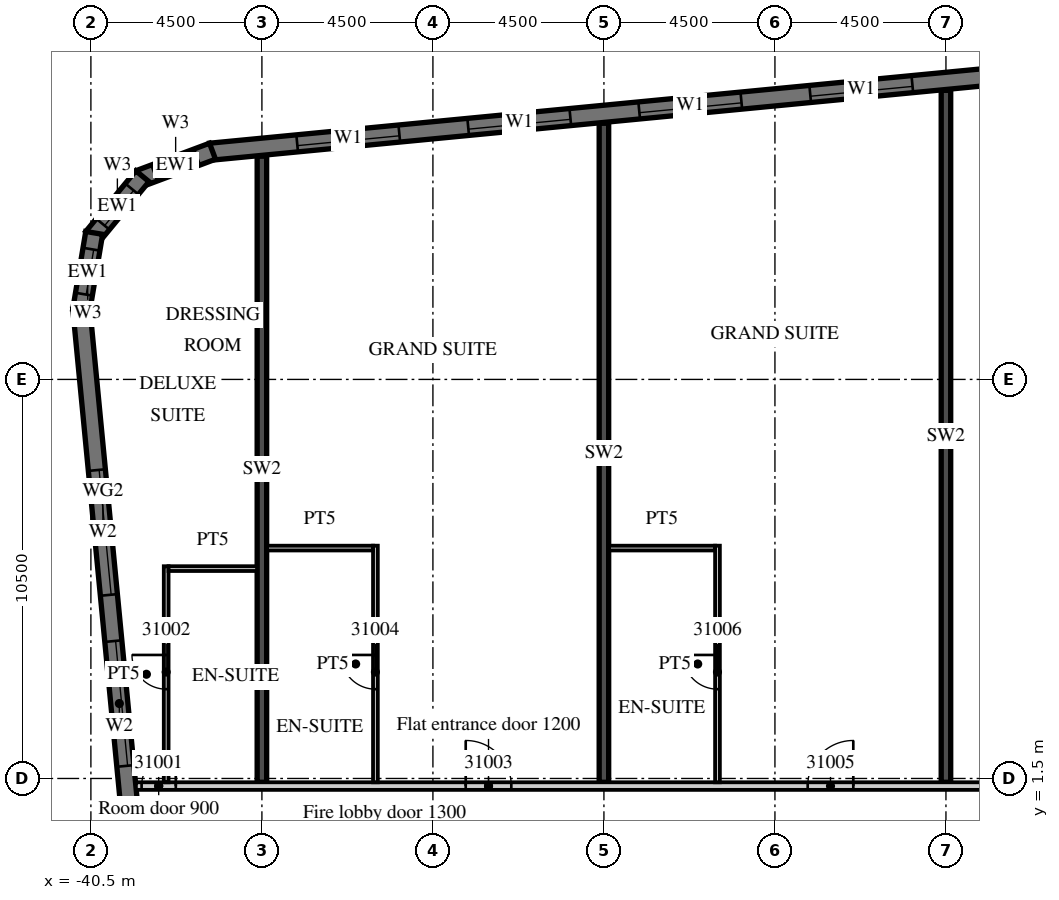
"""IFC4 building model, lengths in metres.
Left out: names, types, materials, properties, quantities, classifications, styles, units other than length and angle.
Written with IfcOpenShell. Run it as: python <this file> out.ifc"""

import sys

from ifc_helpers import new_model, si_unit, direction, frame, frame_2d, origin, place, context, subcontext, project, spatial, polyline, rectangle, outline, extrude, element, fill, save


model = new_model("IFC4")
c1 = context("Model", 3, precision=1e-05, world=origin(), true_north=direction((0.0, 1.0)))
c2 = subcontext(c1, "Body", "Model", "MODEL_VIEW")
j1 = project(units=[si_unit("LENGTHUNIT", "METRE"), si_unit("PLANEANGLEUNIT", "RADIAN")], contexts=[c1])
p1 = place(None, origin())
s1 = spatial("IfcSite", under=j1, at=p1, CompositionType="ELEMENT")
p2 = place(p1, origin())
s2 = spatial("IfcBuilding", under=s1, at=p2, CompositionType="ELEMENT")
p3 = place(p2, frame((0.0, 0.0, 137.2)))
s3 = spatial("IfcBuildingStorey", under=s2, at=p3, CompositionType="ELEMENT", Elevation=137.2)
p4 = place(p3, frame((-36.0, 1.4, 0.0), z_axis=(0.0, 0.0, 1.0), x_axis=(0.0, 1.0, 0.0)))
e1 = element("IfcWall", 1, at=p4, inside=s3, PredefinedType="SHEAR", context=c2, shape_type="SweptSolid", body=[
    extrude(rectangle(XDim=16.474, YDim=0.25, at=frame_2d((8.237, 0.0))), origin(), (0.0, 0.0, 1.0), 3.3),
])
p5 = place(p3, frame((-27.0, 1.4, 0.0), z_axis=(0.0, 0.0, 1.0), x_axis=(0.0, 1.0, 0.0)))
e2 = element("IfcWall", 2, at=p5, inside=s3, PredefinedType="SHEAR", context=c2, shape_type="SweptSolid", body=[
    extrude(rectangle(XDim=17.34, YDim=0.25, at=frame_2d((8.67, 0.0))), origin(), (0.0, 0.0, 1.0), 3.3),
])
p6 = place(p3, frame((-18.0, 1.4, 0.0), z_axis=(0.0, 0.0, 1.0), x_axis=(0.0, 1.0, 0.0)))
e3 = element("IfcWall", 3, at=p6, inside=s3, PredefinedType="SHEAR", context=c2, shape_type="SweptSolid", body=[
    extrude(rectangle(XDim=18.207, YDim=0.25, at=frame_2d((9.104, 0.0))), origin(), (0.0, 0.0, 1.0), 3.3),
])
p7 = place(p3, frame((-40.753, 13.872, 0.0), z_axis=(0.0, 0.0, 1.0), x_axis=(0.095843327381, -0.995396431878, 0.0)))
e4 = element("IfcWall", 4, at=p7, inside=s3, PredefinedType="SOLIDWALL", context=c2, shape_type="SweptSolid", body=[
    extrude(rectangle(XDim=35.0, YDim=0.45, at=frame_2d((17.5, 0.0))), origin(), (0.0, 0.0, 1.0), 3.02),
])
p8 = place(p7, frame((4.277, 0.0, 0.45)))
e5 = element("IfcOpeningElement", 5, at=p8, cuts=e4, PredefinedType="OPENING", context=c2, shape_type="SweptSolid", body=[
    extrude(rectangle(XDim=3.3, YDim=2.25, at=frame_2d((1.65, 1.125))), frame((0.0, 0.235, 0.0), z_axis=(0.0, -1.0, 0.0), x_axis=(1.0, 0.0, 0.0)), (0.0, 0.0, 1.0), 0.47),
])
p9 = place(p7, frame((8.798, 0.0, 0.45)))
e6 = element("IfcOpeningElement", 6, at=p9, cuts=e4, PredefinedType="OPENING", context=c2, shape_type="SweptSolid", body=[
    extrude(rectangle(XDim=3.3, YDim=2.25, at=frame_2d((1.65, 1.125))), frame((0.0, 0.235, 0.0), z_axis=(0.0, -1.0, 0.0), x_axis=(1.0, 0.0, 0.0)), (0.0, 0.0, 1.0), 0.47),
])
p10 = place(p3, frame((13.521, 22.89, 0.0), z_axis=(0.0, 0.0, 1.0), x_axis=(-0.995396445054, -0.095843190545, 0.0)))
e7 = element("IfcWall", 7, at=p10, inside=s3, PredefinedType="SOLIDWALL", context=c2, shape_type="SweptSolid", body=[
    extrude(rectangle(XDim=51.114, YDim=0.45, at=frame_2d((25.557, 0.0))), origin(), (0.0, 0.0, 1.0), 3.02),
])
p11 = place(p10, frame((0.91, 0.0, 0.45)))
e8 = element("IfcOpeningElement", 8, at=p11, cuts=e7, PredefinedType="OPENING", context=c2, shape_type="SweptSolid", body=[
    extrude(rectangle(XDim=2.7, YDim=2.25, at=frame_2d((1.35, 1.125))), frame((0.0, 0.235, 0.0), z_axis=(0.0, -1.0, 0.0), x_axis=(1.0, 0.0, 0.0)), (0.0, 0.0, 1.0), 0.47),
])
p12 = place(p10, frame((5.431, 0.0, 0.45)))
e9 = element("IfcOpeningElement", 9, at=p12, cuts=e7, PredefinedType="OPENING", context=c2, shape_type="SweptSolid", body=[
    extrude(rectangle(XDim=2.7, YDim=2.25, at=frame_2d((1.35, 1.125))), frame((0.0, 0.235, 0.0), z_axis=(0.0, -1.0, 0.0), x_axis=(1.0, 0.0, 0.0)), (0.0, 0.0, 1.0), 0.47),
])
p13 = place(p10, frame((9.952, 0.0, 0.45)))
e10 = element("IfcOpeningElement", 10, at=p13, cuts=e7, PredefinedType="OPENING", context=c2, shape_type="SweptSolid", body=[
    extrude(rectangle(XDim=2.7, YDim=2.25, at=frame_2d((1.35, 1.125))), frame((0.0, 0.235, 0.0), z_axis=(0.0, -1.0, 0.0), x_axis=(1.0, 0.0, 0.0)), (0.0, 0.0, 1.0), 0.47),
])
p14 = place(p10, frame((14.473, 0.0, 0.45)))
e11 = element("IfcOpeningElement", 11, at=p14, cuts=e7, PredefinedType="OPENING", context=c2, shape_type="SweptSolid", body=[
    extrude(rectangle(XDim=2.7, YDim=2.25, at=frame_2d((1.35, 1.125))), frame((0.0, 0.235, 0.0), z_axis=(0.0, -1.0, 0.0), x_axis=(1.0, 0.0, 0.0)), (0.0, 0.0, 1.0), 0.47),
])
p15 = place(p10, frame((18.994, 0.0, 0.45)))
e12 = element("IfcOpeningElement", 12, at=p15, cuts=e7, PredefinedType="OPENING", context=c2, shape_type="SweptSolid", body=[
    extrude(rectangle(XDim=2.7, YDim=2.25, at=frame_2d((1.35, 1.125))), frame((0.0, 0.235, 0.0), z_axis=(0.0, -1.0, 0.0), x_axis=(1.0, 0.0, 0.0)), (0.0, 0.0, 1.0), 0.47),
])
p16 = place(p10, frame((23.514, 0.0, 0.45)))
e13 = element("IfcOpeningElement", 13, at=p16, cuts=e7, PredefinedType="OPENING", context=c2, shape_type="SweptSolid", body=[
    extrude(rectangle(XDim=2.7, YDim=2.25, at=frame_2d((1.35, 1.125))), frame((0.0, 0.235, 0.0), z_axis=(0.0, -1.0, 0.0), x_axis=(1.0, 0.0, 0.0)), (0.0, 0.0, 1.0), 0.47),
])
p17 = place(p10, frame((28.035, 0.0, 0.45)))
e14 = element("IfcOpeningElement", 14, at=p17, cuts=e7, PredefinedType="OPENING", context=c2, shape_type="SweptSolid", body=[
    extrude(rectangle(XDim=2.7, YDim=2.25, at=frame_2d((1.35, 1.125))), frame((0.0, 0.235, 0.0), z_axis=(0.0, -1.0, 0.0), x_axis=(1.0, 0.0, 0.0)), (0.0, 0.0, 1.0), 0.47),
])
p18 = place(p10, frame((32.556, 0.0, 0.45)))
e15 = element("IfcOpeningElement", 15, at=p18, cuts=e7, PredefinedType="OPENING", context=c2, shape_type="SweptSolid", body=[
    extrude(rectangle(XDim=2.7, YDim=2.25, at=frame_2d((1.35, 1.125))), frame((0.0, 0.235, 0.0), z_axis=(0.0, -1.0, 0.0), x_axis=(1.0, 0.0, 0.0)), (0.0, 0.0, 1.0), 0.47),
])
p19 = place(p10, frame((37.077, 0.0, 0.45)))
e16 = element("IfcOpeningElement", 16, at=p19, cuts=e7, PredefinedType="OPENING", context=c2, shape_type="SweptSolid", body=[
    extrude(rectangle(XDim=2.7, YDim=2.25, at=frame_2d((1.35, 1.125))), frame((0.0, 0.235, 0.0), z_axis=(0.0, -1.0, 0.0), x_axis=(1.0, 0.0, 0.0)), (0.0, 0.0, 1.0), 0.47),
])
p20 = place(p10, frame((41.598, 0.0, 0.45)))
e17 = element("IfcOpeningElement", 17, at=p20, cuts=e7, PredefinedType="OPENING", context=c2, shape_type="SweptSolid", body=[
    extrude(rectangle(XDim=2.7, YDim=2.25, at=frame_2d((1.35, 1.125))), frame((0.0, 0.235, 0.0), z_axis=(0.0, -1.0, 0.0), x_axis=(1.0, 0.0, 0.0)), (0.0, 0.0, 1.0), 0.47),
])
p21 = place(p10, frame((46.118, 0.0, 0.45)))
e18 = element("IfcOpeningElement", 18, at=p21, cuts=e7, PredefinedType="OPENING", context=c2, shape_type="SweptSolid", body=[
    extrude(rectangle(XDim=2.7, YDim=2.25, at=frame_2d((1.35, 1.125))), frame((0.0, 0.235, 0.0), z_axis=(0.0, -1.0, 0.0), x_axis=(1.0, 0.0, 0.0)), (0.0, 0.0, 1.0), 0.47),
])
p22 = place(p3, frame((-37.3, 18.004, 0.0), z_axis=(0.0, 0.0, 1.0), x_axis=(-0.936677599948, -0.350192909346, 0.0)))
e19 = element("IfcWall", 19, at=p22, inside=s3, PredefinedType="SOLIDWALL", context=c2, shape_type="SweptSolid", body=[
    extrude(outline(polyline([(0.0, -0.225), (2.071, -0.225), (1.95, 0.225), (0.121, 0.225), (0.0, -0.225)])), origin(), (0.0, 0.0, 1.0), 3.02),
])
p23 = place(p22, frame((0.435, 0.0, 0.45)))
e20 = element("IfcOpeningElement", 20, at=p23, cuts=e19, PredefinedType="OPENING", context=c2, shape_type="SweptSolid", body=[
    extrude(rectangle(XDim=1.2, YDim=2.25, at=frame_2d((0.6, 1.125))), frame((0.0, 0.235, 0.0), z_axis=(0.0, -1.0, 0.0), x_axis=(1.0, 0.0, 0.0)), (0.0, 0.0, 1.0), 0.47),
])
p24 = place(p3, frame((-39.145, 17.347, 0.0), z_axis=(0.0, 0.0, 1.0), x_axis=(-0.636046112757, -0.771651049663, 0.0)))
e21 = element("IfcWall", 21, at=p24, inside=s3, PredefinedType="SOLIDWALL", context=c2, shape_type="SweptSolid", body=[
    extrude(outline(polyline([(0.0, -0.225), (2.071, -0.225), (1.95, 0.225), (0.121, 0.225), (0.0, -0.225)])), origin(), (0.0, 0.0, 1.0), 3.02),
])
p25 = place(p24, frame((0.435, 0.0, 0.45)))
e22 = element("IfcOpeningElement", 22, at=p25, cuts=e21, PredefinedType="OPENING", context=c2, shape_type="SweptSolid", body=[
    extrude(rectangle(XDim=1.2, YDim=2.25, at=frame_2d((0.6, 1.125))), frame((0.0, 0.235, 0.0), z_axis=(0.0, -1.0, 0.0), x_axis=(1.0, 0.0, 0.0)), (0.0, 0.0, 1.0), 0.47),
])
p26 = place(p3, frame((-40.413, 15.855, 0.0), z_axis=(0.0, 0.0, 1.0), x_axis=(-0.165068144653, -0.986282164302, 0.0)))
e23 = element("IfcWall", 23, at=p26, inside=s3, PredefinedType="SOLIDWALL", context=c2, shape_type="SweptSolid", body=[
    extrude(outline(polyline([(0.0, -0.225), (2.071, -0.225), (1.95, 0.225), (0.121, 0.225), (0.0, -0.225)])), origin(), (0.0, 0.0, 1.0), 3.02),
])
p27 = place(p26, frame((0.435, 0.0, 0.45)))
e24 = element("IfcOpeningElement", 24, at=p27, cuts=e23, PredefinedType="OPENING", context=c2, shape_type="SweptSolid", body=[
    extrude(rectangle(XDim=1.2, YDim=2.25, at=frame_2d((0.6, 1.125))), frame((0.0, 0.235, 0.0), z_axis=(0.0, -1.0, 0.0), x_axis=(1.0, 0.0, 0.0)), (0.0, 0.0, 1.0), 0.47),
])
p28 = place(p3, frame((-39.316, 1.3, 0.0), z_axis=(0.0, 0.0, 1.0), x_axis=(1.0, 0.0, 0.0)))
e25 = element("IfcWall", 25, at=p28, inside=s3, PredefinedType="PARTITIONING", context=c2, shape_type="SweptSolid", body=[
    extrude(rectangle(XDim=52.816, YDim=0.2, at=frame_2d((26.408, 0.0))), origin(), (0.0, 0.0, 1.0), 3.02),
])
p29 = place(p28, frame((0.15, 0.0, 0.0)))
e26 = element("IfcOpeningElement", 26, at=p29, cuts=e25, PredefinedType="OPENING", context=c2, shape_type="SweptSolid", body=[
    extrude(rectangle(XDim=0.9, YDim=2.1, at=frame_2d((0.45, 1.05))), frame((0.0, 0.11, 0.0), z_axis=(0.0, -1.0, 0.0), x_axis=(1.0, 0.0, 0.0)), (0.0, 0.0, 1.0), 0.22),
])
p30 = place(p28, frame((8.679, 0.0, 0.0)))
e27 = element("IfcOpeningElement", 27, at=p30, cuts=e25, PredefinedType="OPENING", context=c2, shape_type="SweptSolid", body=[
    extrude(rectangle(XDim=1.2, YDim=2.1, at=frame_2d((0.6, 1.05))), frame((0.0, 0.11, 0.0), z_axis=(0.0, -1.0, 0.0), x_axis=(1.0, 0.0, 0.0)), (0.0, 0.0, 1.0), 0.22),
])
p31 = place(p28, frame((17.678, 0.0, 0.0)))
e28 = element("IfcOpeningElement", 28, at=p31, cuts=e25, PredefinedType="OPENING", context=c2, shape_type="SweptSolid", body=[
    extrude(rectangle(XDim=1.2, YDim=2.1, at=frame_2d((0.6, 1.05))), frame((0.0, 0.11, 0.0), z_axis=(0.0, -1.0, 0.0), x_axis=(1.0, 0.0, 0.0)), (0.0, 0.0, 1.0), 0.22),
])
p32 = place(p28, frame((23.754, 0.0, 0.0)))
e29 = element("IfcOpeningElement", 29, at=p32, cuts=e25, PredefinedType="OPENING", context=c2, shape_type="SweptSolid", body=[
    extrude(rectangle(XDim=1.2, YDim=2.1, at=frame_2d((0.6, 1.05))), frame((0.0, 0.11, 0.0), z_axis=(0.0, -1.0, 0.0), x_axis=(1.0, 0.0, 0.0)), (0.0, 0.0, 1.0), 0.22),
])
p33 = place(p28, frame((30.891, 0.0, 0.0)))
e30 = element("IfcOpeningElement", 30, at=p33, cuts=e25, PredefinedType="OPENING", context=c2, shape_type="SweptSolid", body=[
    extrude(rectangle(XDim=1.0, YDim=2.1, at=frame_2d((0.5, 1.05))), frame((0.0, 0.11, 0.0), z_axis=(0.0, -1.0, 0.0), x_axis=(1.0, 0.0, 0.0)), (0.0, 0.0, 1.0), 0.22),
])
p34 = place(p28, frame((37.741, 0.0, 0.0)))
e31 = element("IfcOpeningElement", 31, at=p34, cuts=e25, PredefinedType="OPENING", context=c2, shape_type="SweptSolid", body=[
    extrude(rectangle(XDim=1.0, YDim=2.1, at=frame_2d((0.5, 1.05))), frame((0.0, 0.11, 0.0), z_axis=(0.0, -1.0, 0.0), x_axis=(1.0, 0.0, 0.0)), (0.0, 0.0, 1.0), 0.22),
])
p35 = place(p28, frame((41.754, 0.0, 0.0)))
e32 = element("IfcOpeningElement", 32, at=p35, cuts=e25, PredefinedType="OPENING", context=c2, shape_type="SweptSolid", body=[
    extrude(rectangle(XDim=1.2, YDim=2.1, at=frame_2d((0.6, 1.05))), frame((0.0, 0.11, 0.0), z_axis=(0.0, -1.0, 0.0), x_axis=(1.0, 0.0, 0.0)), (0.0, 0.0, 1.0), 0.22),
])
p36 = place(p28, frame((48.891, 0.0, 0.0)))
e33 = element("IfcOpeningElement", 33, at=p36, cuts=e25, PredefinedType="OPENING", context=c2, shape_type="SweptSolid", body=[
    extrude(rectangle(XDim=1.0, YDim=2.1, at=frame_2d((0.5, 1.05))), frame((0.0, 0.11, 0.0), z_axis=(0.0, -1.0, 0.0), x_axis=(1.0, 0.0, 0.0)), (0.0, 0.0, 1.0), 0.22),
])
p37 = place(p3, frame((-38.519, 1.4, 0.0), z_axis=(0.0, 0.0, 1.0), x_axis=(0.0, 1.0, 0.0)))
e34 = element("IfcWall", 34, at=p37, inside=s3, PredefinedType="PARTITIONING", context=c2, shape_type="SweptSolid", body=[
    extrude(rectangle(XDim=5.684, YDim=0.125, at=frame_2d((2.842, 0.0))), origin(), (0.0, 0.0, 1.0), 3.02),
])
p38 = place(p37, frame((2.45, 0.0, 0.0)))
e35 = element("IfcOpeningElement", 35, at=p38, cuts=e34, PredefinedType="OPENING", context=c2, shape_type="SweptSolid", body=[
    extrude(rectangle(XDim=0.9, YDim=2.1, at=frame_2d((0.45, 1.05))), frame((0.0, 0.073, 0.0), z_axis=(0.0, -1.0, 0.0), x_axis=(1.0, 0.0, 0.0)), (0.0, 0.0, 1.0), 0.145),
])
p39 = place(p3, frame((-38.457, 7.022, 0.0), z_axis=(0.0, 0.0, 1.0), x_axis=(1.0, 0.0, 0.0)))
e36 = element("IfcWall", 36, at=p39, inside=s3, PredefinedType="PARTITIONING", context=c2, shape_type="SweptSolid", body=[
    extrude(rectangle(XDim=2.332, YDim=0.125, at=frame_2d((1.166, 0.0))), origin(), (0.0, 0.0, 1.0), 3.02),
])
p40 = place(p3, frame((-33.013, 1.4, 0.0), z_axis=(0.0, 0.0, 1.0), x_axis=(0.0, 1.0, 0.0)))
e37 = element("IfcWall", 37, at=p40, inside=s3, PredefinedType="PARTITIONING", context=c2, shape_type="SweptSolid", body=[
    extrude(rectangle(XDim=6.225, YDim=0.125, at=frame_2d((3.113, 0.0))), origin(), (0.0, 0.0, 1.0), 3.02),
])
p41 = place(p40, frame((2.45, 0.0, 0.0)))
e38 = element("IfcOpeningElement", 38, at=p41, cuts=e37, PredefinedType="OPENING", context=c2, shape_type="SweptSolid", body=[
    extrude(rectangle(XDim=0.9, YDim=2.1, at=frame_2d((0.45, 1.05))), frame((0.0, 0.073, 0.0), z_axis=(0.0, -1.0, 0.0), x_axis=(1.0, 0.0, 0.0)), (0.0, 0.0, 1.0), 0.145),
])
p42 = place(p3, frame((-35.875, 7.562, 0.0), z_axis=(0.0, 0.0, 1.0), x_axis=(1.0, 0.0, 0.0)))
e39 = element("IfcWall", 39, at=p42, inside=s3, PredefinedType="PARTITIONING", context=c2, shape_type="SweptSolid", body=[
    extrude(rectangle(XDim=2.8, YDim=0.125, at=frame_2d((1.4, 0.0))), origin(), (0.0, 0.0, 1.0), 3.02),
])
p43 = place(p3, frame((-24.012, 1.4, 0.0), z_axis=(0.0, 0.0, 1.0), x_axis=(0.0, 1.0, 0.0)))
e40 = element("IfcWall", 40, at=p43, inside=s3, PredefinedType="PARTITIONING", context=c2, shape_type="SweptSolid", body=[
    extrude(rectangle(XDim=6.225, YDim=0.125, at=frame_2d((3.113, 0.0))), origin(), (0.0, 0.0, 1.0), 3.02),
])
p44 = place(p43, frame((2.45, 0.0, 0.0)))
e41 = element("IfcOpeningElement", 41, at=p44, cuts=e40, PredefinedType="OPENING", context=c2, shape_type="SweptSolid", body=[
    extrude(rectangle(XDim=0.9, YDim=2.1, at=frame_2d((0.45, 1.05))), frame((0.0, 0.073, 0.0), z_axis=(0.0, -1.0, 0.0), x_axis=(1.0, 0.0, 0.0)), (0.0, 0.0, 1.0), 0.145),
])
p45 = place(p3, frame((-26.875, 7.562, 0.0), z_axis=(0.0, 0.0, 1.0), x_axis=(1.0, 0.0, 0.0)))
e42 = element("IfcWall", 42, at=p45, inside=s3, PredefinedType="PARTITIONING", context=c2, shape_type="SweptSolid", body=[
    extrude(rectangle(XDim=2.8, YDim=0.125, at=frame_2d((1.4, 0.0))), origin(), (0.0, 0.0, 1.0), 3.02),
])
p46 = place(p8, origin())
e43 = element("IfcWindow", 43, at=p46, inside=s3, PartitioningType="SINGLE_PANEL", PredefinedType="WINDOW", context=c2, shape_type="SweptSolid", body=[
    extrude(rectangle(XDim=3.3, YDim=2.25, at=frame_2d((1.65, 1.125))), frame((0.0, 0.09, 0.0), z_axis=(0.0, -1.0, 0.0), x_axis=(1.0, 0.0, 0.0)), (0.0, 0.0, 1.0), 0.06),
])
fill(e5, e43)
p47 = place(p9, origin())
e44 = element("IfcWindow", 44, at=p47, inside=s3, PartitioningType="SINGLE_PANEL", PredefinedType="WINDOW", context=c2, shape_type="SweptSolid", body=[
    extrude(rectangle(XDim=3.3, YDim=2.25, at=frame_2d((1.65, 1.125))), frame((0.0, 0.09, 0.0), z_axis=(0.0, -1.0, 0.0), x_axis=(1.0, 0.0, 0.0)), (0.0, 0.0, 1.0), 0.06),
])
fill(e6, e44)
p48 = place(p18, origin())
e45 = element("IfcWindow", 45, at=p48, inside=s3, PartitioningType="SINGLE_PANEL", PredefinedType="WINDOW", context=c2, shape_type="SweptSolid", body=[
    extrude(rectangle(XDim=2.7, YDim=2.25, at=frame_2d((1.35, 1.125))), frame((0.0, 0.09, 0.0), z_axis=(0.0, -1.0, 0.0), x_axis=(1.0, 0.0, 0.0)), (0.0, 0.0, 1.0), 0.06),
])
fill(e15, e45)
p49 = place(p19, origin())
e46 = element("IfcWindow", 46, at=p49, inside=s3, PartitioningType="SINGLE_PANEL", PredefinedType="WINDOW", context=c2, shape_type="SweptSolid", body=[
    extrude(rectangle(XDim=2.7, YDim=2.25, at=frame_2d((1.35, 1.125))), frame((0.0, 0.09, 0.0), z_axis=(0.0, -1.0, 0.0), x_axis=(1.0, 0.0, 0.0)), (0.0, 0.0, 1.0), 0.06),
])
fill(e16, e46)
p50 = place(p20, origin())
e47 = element("IfcWindow", 47, at=p50, inside=s3, PartitioningType="SINGLE_PANEL", PredefinedType="WINDOW", context=c2, shape_type="SweptSolid", body=[
    extrude(rectangle(XDim=2.7, YDim=2.25, at=frame_2d((1.35, 1.125))), frame((0.0, 0.09, 0.0), z_axis=(0.0, -1.0, 0.0), x_axis=(1.0, 0.0, 0.0)), (0.0, 0.0, 1.0), 0.06),
])
fill(e17, e47)
p51 = place(p21, origin())
e48 = element("IfcWindow", 48, at=p51, inside=s3, PartitioningType="SINGLE_PANEL", PredefinedType="WINDOW", context=c2, shape_type="SweptSolid", body=[
    extrude(rectangle(XDim=2.7, YDim=2.25, at=frame_2d((1.35, 1.125))), frame((0.0, 0.09, 0.0), z_axis=(0.0, -1.0, 0.0), x_axis=(1.0, 0.0, 0.0)), (0.0, 0.0, 1.0), 0.06),
])
fill(e18, e48)
p52 = place(p23, origin())
e49 = element("IfcWindow", 49, at=p52, inside=s3, PartitioningType="SINGLE_PANEL", PredefinedType="WINDOW", context=c2, shape_type="SweptSolid", body=[
    extrude(rectangle(XDim=1.2, YDim=2.25, at=frame_2d((0.6, 1.125))), frame((0.0, 0.09, 0.0), z_axis=(0.0, -1.0, 0.0), x_axis=(1.0, 0.0, 0.0)), (0.0, 0.0, 1.0), 0.06),
])
fill(e20, e49)
p53 = place(p25, origin())
e50 = element("IfcWindow", 50, at=p53, inside=s3, PartitioningType="SINGLE_PANEL", PredefinedType="WINDOW", context=c2, shape_type="SweptSolid", body=[
    extrude(rectangle(XDim=1.2, YDim=2.25, at=frame_2d((0.6, 1.125))), frame((0.0, 0.09, 0.0), z_axis=(0.0, -1.0, 0.0), x_axis=(1.0, 0.0, 0.0)), (0.0, 0.0, 1.0), 0.06),
])
fill(e22, e50)
p54 = place(p27, origin())
e51 = element("IfcWindow", 51, at=p54, inside=s3, PartitioningType="SINGLE_PANEL", PredefinedType="WINDOW", context=c2, shape_type="SweptSolid", body=[
    extrude(rectangle(XDim=1.2, YDim=2.25, at=frame_2d((0.6, 1.125))), frame((0.0, 0.09, 0.0), z_axis=(0.0, -1.0, 0.0), x_axis=(1.0, 0.0, 0.0)), (0.0, 0.0, 1.0), 0.06),
])
fill(e24, e51)
p55 = place(p29, origin())
e52 = element("IfcDoor", 52, at=p55, inside=s3, OperationType="SINGLE_SWING_RIGHT", PredefinedType="DOOR", context=c2, shape_type="SweptSolid", body=[
    extrude(rectangle(XDim=0.9, YDim=2.1, at=frame_2d((0.45, 1.05))), frame((0.0, 0.025, 0.0), z_axis=(0.0, -1.0, 0.0), x_axis=(1.0, 0.0, 0.0)), (0.0, 0.0, 1.0), 0.05),
])
fill(e26, e52)
p56 = place(p38, origin())
e53 = element("IfcDoor", 53, at=p56, inside=s3, OperationType="SINGLE_SWING_RIGHT", PredefinedType="DOOR", context=c2, shape_type="SweptSolid", body=[
    extrude(rectangle(XDim=0.9, YDim=2.1, at=frame_2d((0.45, 1.05))), frame((0.0, 0.025, 0.0), z_axis=(0.0, -1.0, 0.0), x_axis=(1.0, 0.0, 0.0)), (0.0, 0.0, 1.0), 0.05),
])
fill(e35, e53)
p57 = place(p30, origin())
e54 = element("IfcDoor", 54, at=p57, inside=s3, OperationType="SINGLE_SWING_LEFT", PredefinedType="DOOR", context=c2, shape_type="SweptSolid", body=[
    extrude(rectangle(XDim=1.2, YDim=2.1, at=frame_2d((0.6, 1.05))), frame((0.0, 0.025, 0.0), z_axis=(0.0, -1.0, 0.0), x_axis=(1.0, 0.0, 0.0)), (0.0, 0.0, 1.0), 0.05),
])
fill(e27, e54)
p58 = place(p41, origin())
e55 = element("IfcDoor", 55, at=p58, inside=s3, OperationType="SINGLE_SWING_RIGHT", PredefinedType="DOOR", context=c2, shape_type="SweptSolid", body=[
    extrude(rectangle(XDim=0.9, YDim=2.1, at=frame_2d((0.45, 1.05))), frame((0.0, 0.025, 0.0), z_axis=(0.0, -1.0, 0.0), x_axis=(1.0, 0.0, 0.0)), (0.0, 0.0, 1.0), 0.05),
])
fill(e38, e55)
p59 = place(p31, origin())
e56 = element("IfcDoor", 56, at=p59, inside=s3, OperationType="SINGLE_SWING_RIGHT", PredefinedType="DOOR", context=c2, shape_type="SweptSolid", body=[
    extrude(rectangle(XDim=1.2, YDim=2.1, at=frame_2d((0.6, 1.05))), frame((0.0, 0.025, 0.0), z_axis=(0.0, -1.0, 0.0), x_axis=(1.0, 0.0, 0.0)), (0.0, 0.0, 1.0), 0.05),
])
fill(e28, e56)
p60 = place(p44, origin())
e57 = element("IfcDoor", 57, at=p60, inside=s3, OperationType="SINGLE_SWING_RIGHT", PredefinedType="DOOR", context=c2, shape_type="SweptSolid", body=[
    extrude(rectangle(XDim=0.9, YDim=2.1, at=frame_2d((0.45, 1.05))), frame((0.0, 0.025, 0.0), z_axis=(0.0, -1.0, 0.0), x_axis=(1.0, 0.0, 0.0)), (0.0, 0.0, 1.0), 0.05),
])
fill(e41, e57)
save(model, sys.argv[1])
